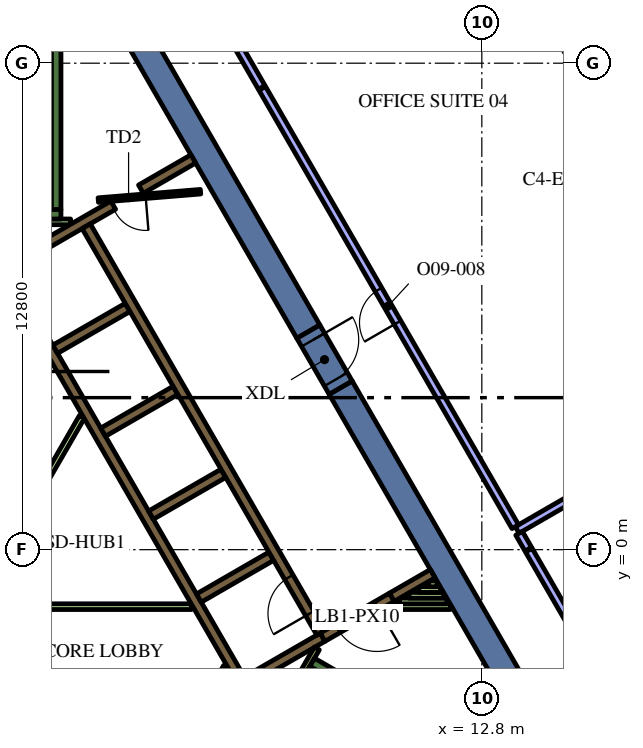
"""IFC4 building model, lengths in metres.
Left out: names, types, materials, properties, quantities, classifications, styles, units other than length and angle.
Written with IfcOpenShell. Run it as: python <this file> out.ifc"""

import sys

from ifc_helpers import new_model, si_unit, direction, frame, frame_2d, origin, place, context, subcontext, project, spatial, rectangle, extrude, element, fill, save


model = new_model("IFC4")
c1 = context("Model", 3, precision=1e-05, world=origin(), true_north=direction((0.0, 1.0)))
c2 = subcontext(c1, "Body", "Model", "MODEL_VIEW")
j1 = project(units=[si_unit("LENGTHUNIT", "METRE"), si_unit("PLANEANGLEUNIT", "RADIAN")], contexts=[c1])
p1 = place(None, origin())
s1 = spatial("IfcSite", under=j1, at=p1, CompositionType="ELEMENT")
p2 = place(p1, origin())
s2 = spatial("IfcBuilding", under=s1, at=p2, CompositionType="ELEMENT")
p3 = place(p2, frame((0.0, 0.0, 247.8)))
s3 = spatial("IfcBuildingStorey", under=s2, at=p3, CompositionType="ELEMENT", Elevation=247.8)
for number, where, z_axis, x_axis in (
    (1, (9.085, 4.264, 0.0), (0.0, 0.0, 1.0), (0.5, -0.866, 0.0)),
    (2, (8.235, 5.736, 0.0), (0.0, 0.0, 1.0), (-0.5, 0.866, 0.0)),
):
    element("IfcWall", number, at=place(p3, frame(where, z_axis=z_axis, x_axis=x_axis)), inside=s3, PredefinedType="SOLIDWALL", context=c2, shape_type="SweptSolid", body=[
        extrude(rectangle(XDim=12.472, YDim=0.7, at=frame_2d((6.236, 0.0))), origin(), (0.0, 0.0, 1.0), 4.2),
    ])
p4 = place(p3, frame((8.334, -2.964, 0.0), z_axis=(0.0, 0.0, 1.0), x_axis=(0.866016039709, -0.500016218704, 0.0)))
e3 = element("IfcWall", 3, at=p4, inside=s3, PredefinedType="SOLIDWALL", context=c2, shape_type="SweptSolid", body=[
    extrude(rectangle(XDim=7.05, YDim=0.25, at=frame_2d((3.525, 0.0))), origin(), (0.0, 0.0, 1.0), 4.2),
])
p5 = place(p3, frame((8.168, -3.503, 0.0), z_axis=(0.0, 0.0, 1.0), x_axis=(0.49972245349, 0.866185586049, 0.0)))
e4 = element("IfcWall", 4, at=p5, inside=s3, PredefinedType="SOLIDWALL", context=c2, shape_type="SweptSolid", body=[
    extrude(rectangle(XDim=0.425, YDim=0.25, at=frame_2d((0.212, 0.0))), origin(), (0.0, 0.0, 1.0), 4.2),
])
p6 = place(p3, frame((1.6, 8.95, 0.0), z_axis=(0.0, 0.0, 1.0), x_axis=(0.0, 1.0, 0.0)))
e5 = element("IfcWall", 5, at=p6, inside=s3, PredefinedType="SOLIDWALL", context=c2, shape_type="SweptSolid", body=[
    extrude(rectangle(XDim=6.8, YDim=0.25, at=frame_2d((3.4, 0.0))), origin(), (0.0, 0.0, 1.0), 4.2),
])
p7 = place(p3, frame((1.05, 8.825, 0.0), z_axis=(0.0, 0.0, 1.0), x_axis=(1.0, 0.0, 0.0)))
e6 = element("IfcWall", 6, at=p7, inside=s3, PredefinedType="SOLIDWALL", context=c2, shape_type="SweptSolid", body=[
    extrude(rectangle(XDim=0.675, YDim=0.25, at=frame_2d((0.337, 0.0))), origin(), (0.0, 0.0, 1.0), 4.2),
])
p8 = place(p3, frame((11.507, -0.631, 0.0), z_axis=(0.0, 0.0, 1.0), x_axis=(-0.866025525965, -0.499999788377, 0.0)))
e7 = element("IfcWall", 7, at=p8, inside=s3, PredefinedType="SOLIDWALL", context=c2, shape_type="SweptSolid", body=[
    extrude(rectangle(XDim=1.245, YDim=0.25, at=frame_2d((0.622, 0.0))), origin(), (0.0, 0.0, 1.0), 4.2),
])
p9 = place(p3, frame((6.568, -3.627, 0.0), z_axis=(0.0, 0.0, 1.0), x_axis=(-0.499999455981, 0.866025717874, 0.0)))
e8 = element("IfcWall", 8, at=p9, inside=s3, PredefinedType="SOLIDWALL", context=c2, shape_type="SweptSolid", body=[
    extrude(rectangle(XDim=11.978, YDim=0.25, at=frame_2d((5.989, 0.0))), origin(), (0.0, 0.0, 1.0), 4.2),
])
p10 = place(p3, frame((3.1, 9.064, 0.0), z_axis=(0.0, 0.0, 1.0), x_axis=(-0.866030133475, -0.499991807846, 0.0)))
e9 = element("IfcWall", 9, at=p10, inside=s3, PredefinedType="SOLIDWALL", context=c2, shape_type="SweptSolid", body=[
    extrude(rectangle(XDim=3.217, YDim=0.25, at=frame_2d((1.608, 0.0))), origin(), (0.0, 0.0, 1.0), 4.2),
])
p11 = place(p3, frame((1.574, 5.274, 0.0), z_axis=(0.0, 0.0, 1.0), x_axis=(0.866028486751, 0.499994660107, 0.0)))
e10 = element("IfcWall", 10, at=p11, inside=s3, PredefinedType="SOLIDWALL", context=c2, shape_type="SweptSolid", body=[
    extrude(rectangle(XDim=2.2, YDim=0.25, at=frame_2d((1.1, 0.0))), origin(), (0.0, 0.0, 1.0), 4.2),
])
for number, where, z_axis, x_axis in (
    (11, (2.834, 3.091, 0.0), (0.0, 0.0, 1.0), (0.866, 0.5, 0.0)),
    (12, (4.094, 0.909, 0.0), (0.0, 0.0, 1.0), (0.866, 0.5, 0.0)),
    (13, (5.354, -1.274, 0.0), (0.0, 0.0, 1.0), (0.866, 0.5, 0.0)),
):
    element("IfcWall", number, at=place(p3, frame(where, z_axis=z_axis, x_axis=x_axis)), inside=s3, PredefinedType="SOLIDWALL", context=c2, shape_type="SweptSolid", body=[
        extrude(rectangle(XDim=2.2, YDim=0.25, at=frame_2d((1.1, 0.0))), origin(), (0.0, 0.0, 1.0), 4.2),
    ])
p12 = place(p3, frame((6.614, -3.456, 0.0), z_axis=(0.0, 0.0, 1.0), x_axis=(0.866025089694, 0.500000544019, 0.0)))
e14 = element("IfcWall", 14, at=p12, inside=s3, PredefinedType="SOLIDWALL", context=c2, shape_type="SweptSolid", body=[
    extrude(rectangle(XDim=2.305, YDim=0.25, at=frame_2d((1.153, 0.0))), origin(), (0.0, 0.0, 1.0), 4.2),
])
p13 = place(p3, frame((3.83, 9.486, 0.0), z_axis=(0.0, 0.0, 1.0), x_axis=(0.865986202621, 0.500067892261, 0.0)))
e15 = element("IfcWall", 15, at=p13, inside=s3, PredefinedType="SOLIDWALL", context=c2, shape_type="SweptSolid", body=[
    extrude(rectangle(XDim=1.591, YDim=0.25, at=frame_2d((0.795, 0.0))), origin(), (0.0, 0.0, 1.0), 4.2),
])
p14 = place(p3, frame((1.05, 8.625, 0.0), z_axis=(0.0, 0.0, 1.0), x_axis=(1.0, 0.0, 0.0)))
e16 = element("IfcWall", 16, at=p14, inside=s3, PredefinedType="PARTITIONING", context=c2, shape_type="SweptSolid", body=[
    extrude(rectangle(XDim=0.929, YDim=0.15, at=frame_2d((0.464, 0.0))), origin(), (0.0, 0.0, 1.0), 3.45),
])
p15 = place(p3, frame((10.362, -1.5, 0.0), z_axis=(0.0, 0.0, 1.0), x_axis=(1.0, 0.0, 0.0)))
e17 = element("IfcWall", 17, at=p15, inside=s3, PredefinedType="PARTITIONING", context=c2, shape_type="SweptSolid", body=[
    extrude(rectangle(XDim=1.61, YDim=0.15, at=frame_2d((0.805, 0.0))), origin(), (0.0, 0.0, 1.0), 3.45),
])
p16 = place(p3, frame((10.622, -1.35, 0.0), z_axis=(0.0, 0.0, 1.0), x_axis=(1.0, 0.0, 0.0)))
e18 = element("IfcWall", 18, at=p16, inside=s3, PredefinedType="PARTITIONING", context=c2, shape_type="SweptSolid", body=[
    extrude(rectangle(XDim=1.263, YDim=0.15, at=frame_2d((0.632, 0.0))), origin(), (0.0, 0.0, 1.0), 3.45),
])
p17 = place(p3, frame((10.882, -1.2, 0.0), z_axis=(0.0, 0.0, 1.0), x_axis=(1.0, 0.0, 0.0)))
e19 = element("IfcWall", 19, at=p17, inside=s3, PredefinedType="PARTITIONING", context=c2, shape_type="SweptSolid", body=[
    extrude(rectangle(XDim=0.917, YDim=0.15, at=frame_2d((0.459, 0.0))), origin(), (0.0, 0.0, 1.0), 3.45),
])
p18 = place(p3, frame((11.712, -1.05, 0.0), z_axis=(0.0, 0.0, 1.0), x_axis=(-1.0, 0.0, 0.0)))
e20 = element("IfcWall", 20, at=p18, inside=s3, PredefinedType="PARTITIONING", context=c2, shape_type="SweptSolid", body=[
    extrude(rectangle(XDim=0.571, YDim=0.15, at=frame_2d((0.285, 0.0))), origin(), (0.0, 0.0, 1.0), 3.45),
])
p19 = place(p3, frame((11.401, -0.9, 0.0), z_axis=(0.0, 0.0, 1.0), x_axis=(1.0, 0.0, 0.0)))
e21 = element("IfcWall", 21, at=p19, inside=s3, PredefinedType="PARTITIONING", context=c2, shape_type="SweptSolid", body=[
    extrude(rectangle(XDim=0.224, YDim=0.15, at=frame_2d((0.112, 0.0))), origin(), (0.0, 0.0, 1.0), 3.45),
])
p20 = place(p3, frame((8.459, -2.599, 0.0), z_axis=(0.0, 0.0, 1.0), x_axis=(-0.500041054325, -0.866001699761, 0.0)))
e22 = element("IfcWall", 22, at=p20, inside=s3, PredefinedType="PARTITIONING", context=c2, shape_type="SweptSolid", body=[
    extrude(rectangle(XDim=0.929, YDim=0.15, at=frame_2d((0.464, 0.0))), origin(), (0.0, 0.0, 1.0), 4.2),
])
p21 = place(p3, frame((5.705, -3.718, 0.0), z_axis=(0.0, 0.0, 1.0), x_axis=(0.499962090823, 0.866047289552, 0.0)))
e23 = element("IfcWall", 23, at=p21, inside=s3, PredefinedType="PARTITIONING", context=c2, shape_type="SweptSolid", body=[
    extrude(rectangle(XDim=0.735, YDim=0.15, at=frame_2d((0.367, 0.0))), origin(), (0.0, 0.0, 1.0), 3.45),
])
p22 = place(p3, frame((-4.2, -1.5, 0.0), z_axis=(0.0, 0.0, 1.0), x_axis=(1.0, 0.0, 0.0)))
e24 = element("IfcWall", 24, at=p22, inside=s3, PredefinedType="PARTITIONING", context=c2, shape_type="SweptSolid", body=[
    extrude(rectangle(XDim=9.359, YDim=0.15, at=frame_2d((4.68, 0.0))), origin(), (0.0, 0.0, 1.0), 3.45),
])
p23 = place(p3, frame((1.312, 1.822, 0.0), z_axis=(0.0, 0.0, 1.0), x_axis=(0.500003549559, 0.866023354436, 0.0)))
e25 = element("IfcWall", 25, at=p23, inside=s3, PredefinedType="PARTITIONING", context=c2, shape_type="SweptSolid", body=[
    extrude(rectangle(XDim=1.93, YDim=0.15, at=frame_2d((0.965, 0.0))), origin(), (0.0, 0.0, 1.0), 3.45),
])
p24 = place(p3, frame((8.565, -2.185, 0.0), z_axis=(0.0, 0.0, 1.0), x_axis=(-0.499997954832, 0.866026584559, 0.0)))
e26 = element("IfcWall", 26, at=p24, inside=s3, PredefinedType="SOLIDWALL", context=c2, shape_type="SweptSolid", body=[
    extrude(rectangle(XDim=12.35, YDim=0.25, at=frame_2d((6.175, 0.0))), origin(), (0.0, 0.0, 1.0), 4.2),
])
p25 = place(p24, frame((0.585, 0.0, 0.0)))
e27 = element("IfcOpeningElement", 27, at=p25, cuts=e26, PredefinedType="OPENING", context=c2, shape_type="SweptSolid", body=[
    extrude(rectangle(XDim=1.1, YDim=2.1, at=frame_2d((0.55, 1.05))), frame((0.0, 0.135, 0.0), z_axis=(0.0, -1.0, 0.0), x_axis=(1.0, 0.0, 0.0)), (0.0, 0.0, 1.0), 0.27),
])
p26 = place(p3, frame((5.398, 9.419, 0.0), z_axis=(0.0, 0.0, 1.0), x_axis=(-0.996653416376, -0.081743303248, 0.0)))
e28 = element("IfcWall", 28, at=p26, inside=s3, PredefinedType="PARTITIONING", context=c2, shape_type="SweptSolid", body=[
    extrude(rectangle(XDim=2.7, YDim=0.12, at=frame_2d((1.35, 0.0))), origin(), (0.0, 0.0, 1.0), 3.45),
])
p27 = place(p26, frame((1.45, 0.0, 0.0)))
e29 = element("IfcOpeningElement", 29, at=p27, cuts=e28, PredefinedType="OPENING", context=c2, shape_type="SweptSolid", body=[
    extrude(rectangle(XDim=0.9, YDim=2.1, at=frame_2d((0.45, 1.05))), frame((0.0, 0.07, 0.0), z_axis=(0.0, -1.0, 0.0), x_axis=(1.0, 0.0, 0.0)), (0.0, 0.0, 1.0), 0.14),
])
p28 = place(p3, frame((10.429, -1.253, 0.0), z_axis=(0.0, 0.0, 1.0), x_axis=(-0.866009402589, -0.500027713859, 0.0)))
e30 = element("IfcWall", 30, at=p28, inside=s3, PredefinedType="SOLIDWALL", context=c2, shape_type="SweptSolid", body=[
    extrude(rectangle(XDim=2.1, YDim=0.25, at=frame_2d((1.05, 0.0))), origin(), (0.0, 0.0, 1.0), 4.2),
])
p29 = place(p28, frame((0.45, 0.0, 0.0)))
e31 = element("IfcOpeningElement", 31, at=p29, cuts=e30, PredefinedType="OPENING", context=c2, shape_type="SweptSolid", body=[
    extrude(rectangle(XDim=1.2, YDim=2.1, at=frame_2d((0.6, 1.05))), frame((0.0, 0.135, 0.0), z_axis=(0.0, -1.0, 0.0), x_axis=(1.0, 0.0, 0.0)), (0.0, 0.0, 1.0), 0.27),
])
p30 = place(p3, frame((8.235, 5.736, 0.0), z_axis=(0.0, 0.0, 1.0), x_axis=(0.499954529098, -0.86605165483, 0.0)))
e32 = element("IfcWall", 32, at=p30, inside=s3, PredefinedType="SOLIDWALL", context=c2, shape_type="SweptSolid", body=[
    extrude(rectangle(XDim=1.7, YDim=0.7, at=frame_2d((0.85, 0.0))), origin(), (0.0, 0.0, 1.0), 4.2),
])
p31 = place(p30, frame((0.25, 0.0, 0.0)))
e33 = element("IfcOpeningElement", 33, at=p31, cuts=e32, PredefinedType="OPENING", context=c2, shape_type="SweptSolid", body=[
    extrude(rectangle(XDim=1.2, YDim=2.1, at=frame_2d((0.6, 1.05))), frame((0.0, 0.36, 0.0), z_axis=(0.0, -1.0, 0.0), x_axis=(1.0, 0.0, 0.0)), (0.0, 0.0, 1.0), 0.72),
])
p32 = place(p3, frame((13.731, 0.518, 0.0), z_axis=(0.0, 0.0, 1.0), x_axis=(0.8660128559, 0.500021732944, 0.0)))
e34 = element("IfcWall", 34, at=p32, inside=s3, PredefinedType="PARTITIONING", context=c2, shape_type="SweptSolid", body=[
    extrude(rectangle(XDim=3.625, YDim=0.2, at=frame_2d((1.812, 0.0))), origin(), (0.0, 0.0, 1.0), 3.45),
])
p33 = place(p3, frame((14.022, 0.013, 0.0), z_axis=(0.0, 0.0, 1.0), x_axis=(-0.500159754115, 0.865933150054, 0.0)))
e35 = element("IfcWall", 35, at=p33, inside=s3, PredefinedType="PARTITIONING", context=c2, shape_type="SweptSolid", body=[
    extrude(rectangle(XDim=0.483, YDim=0.2, at=frame_2d((0.242, 0.0))), origin(), (0.0, 0.0, 1.0), 3.45),
])
p34 = place(p3, frame((17.681, -6.324, 0.0), z_axis=(0.0, 0.0, 1.0), x_axis=(-0.50002695829, 0.866009838849, 0.0)))
e36 = element("IfcWall", 36, at=p34, inside=s3, PredefinedType="PARTITIONING", context=c2, shape_type="SweptSolid", body=[
    extrude(rectangle(XDim=7.287, YDim=0.2, at=frame_2d((3.644, 0.0))), origin(), (0.0, 0.0, 1.0), 3.45),
])
p35 = place(p34, frame((3.1, 0.0, 0.0)))
e37 = element("IfcOpeningElement", 37, at=p35, cuts=e36, PredefinedType="OPENING", context=c2, shape_type="SweptSolid", body=[
    extrude(rectangle(XDim=1.0, YDim=2.1, at=frame_2d((0.5, 1.05))), frame((0.0, 0.11, 0.0), z_axis=(0.0, -1.0, 0.0), x_axis=(1.0, 0.0, 0.0)), (0.0, 0.0, 1.0), 0.22),
])
p36 = place(p3, frame((13.681, 0.604, 0.0), z_axis=(0.0, 0.0, 1.0), x_axis=(-0.500001759768, 0.86602438778, 0.0)))
e38 = element("IfcWall", 38, at=p36, inside=s3, PredefinedType="PARTITIONING", context=c2, shape_type="SweptSolid", body=[
    extrude(rectangle(XDim=13.317, YDim=0.2, at=frame_2d((6.658, 0.0))), origin(), (0.0, 0.0, 1.0), 3.45),
])
p37 = place(p36, frame((6.2, 0.0, 0.0)))
e39 = element("IfcOpeningElement", 39, at=p37, cuts=e38, PredefinedType="OPENING", context=c2, shape_type="SweptSolid", body=[
    extrude(rectangle(XDim=1.0, YDim=2.1, at=frame_2d((0.5, 1.05))), frame((0.0, 0.11, 0.0), z_axis=(0.0, -1.0, 0.0), x_axis=(1.0, 0.0, 0.0)), (0.0, 0.0, 1.0), 0.22),
])
p38 = place(p3, frame((7.007, 12.163, 0.0), z_axis=(0.0, 0.0, 1.0), x_axis=(-0.499986040413, 0.866033463206, 0.0)))
e40 = element("IfcWall", 40, at=p38, inside=s3, PredefinedType="PARTITIONING", context=c2, shape_type="SweptSolid", body=[
    extrude(rectangle(XDim=5.693, YDim=0.2, at=frame_2d((2.846, 0.0))), origin(), (0.0, 0.0, 1.0), 3.45),
])
p39 = place(p3, frame((16.782, 10.331, 0.0), z_axis=(0.0, 0.0, 1.0), x_axis=(-0.517846166225, 0.855473756538, 0.0)))
e41 = element("IfcWall", 41, at=p39, inside=s3, PredefinedType="SOLIDWALL", context=c2, shape_type="SweptSolid", body=[
    extrude(rectangle(XDim=5.298, YDim=0.24, at=frame_2d((2.649, 0.0))), origin(), (0.0, 0.0, 1.0), 3.95),
])
p40 = place(p39, frame((0.294, 0.0, 0.9)))
e42 = element("IfcOpeningElement", 42, at=p40, cuts=e41, PredefinedType="OPENING", context=c2, shape_type="SweptSolid", body=[
    extrude(rectangle(XDim=1.5, YDim=2.55, at=frame_2d((0.75, 1.275))), frame((0.0, 0.13, 0.0), z_axis=(0.0, -1.0, 0.0), x_axis=(1.0, 0.0, 0.0)), (0.0, 0.0, 1.0), 0.26),
])
p41 = place(p39, frame((3.504, 0.0, 0.9)))
e43 = element("IfcOpeningElement", 43, at=p41, cuts=e41, PredefinedType="OPENING", context=c2, shape_type="SweptSolid", body=[
    extrude(rectangle(XDim=1.5, YDim=2.55, at=frame_2d((0.75, 1.275))), frame((0.0, 0.13, 0.0), z_axis=(0.0, -1.0, 0.0), x_axis=(1.0, 0.0, 0.0)), (0.0, 0.0, 1.0), 0.26),
])
p42 = place(p25, origin())
e44 = element("IfcDoor", 44, at=p42, inside=s3, OperationType="DOUBLE_DOOR_SLIDING", PredefinedType="DOOR", context=c2, shape_type="SweptSolid", body=[
    extrude(rectangle(XDim=1.1, YDim=2.1, at=frame_2d((0.55, 1.05))), frame((0.0, 0.025, 0.0), z_axis=(0.0, -1.0, 0.0), x_axis=(1.0, 0.0, 0.0)), (0.0, 0.0, 1.0), 0.05),
])
fill(e27, e44)
p43 = place(p27, origin())
e45 = element("IfcDoor", 45, at=p43, inside=s3, OperationType="SINGLE_SWING_LEFT", PredefinedType="DOOR", context=c2, shape_type="SweptSolid", body=[
    extrude(rectangle(XDim=0.9, YDim=2.1, at=frame_2d((0.45, 1.05))), frame((0.0, 0.025, 0.0), z_axis=(0.0, -1.0, 0.0), x_axis=(1.0, 0.0, 0.0)), (0.0, 0.0, 1.0), 0.05),
])
fill(e29, e45)
p44 = place(p29, origin())
e46 = element("IfcDoor", 46, at=p44, inside=s3, OperationType="SINGLE_SWING_LEFT", PredefinedType="DOOR", context=c2, shape_type="SweptSolid", body=[
    extrude(rectangle(XDim=1.2, YDim=2.1, at=frame_2d((0.6, 1.05))), frame((0.0, 0.025, 0.0), z_axis=(0.0, -1.0, 0.0), x_axis=(1.0, 0.0, 0.0)), (0.0, 0.0, 1.0), 0.05),
])
fill(e31, e46)
p45 = place(p31, origin())
e47 = element("IfcDoor", 47, at=p45, inside=s3, OperationType="SINGLE_SWING_LEFT", PredefinedType="DOOR", context=c2, shape_type="SweptSolid", body=[
    extrude(rectangle(XDim=1.2, YDim=2.1, at=frame_2d((0.6, 1.05))), frame((0.0, 0.025, 0.0), z_axis=(0.0, -1.0, 0.0), x_axis=(1.0, 0.0, 0.0)), (0.0, 0.0, 1.0), 0.05),
])
fill(e33, e47)
p46 = place(p37, origin())
e48 = element("IfcDoor", 48, at=p46, inside=s3, OperationType="SINGLE_SWING_RIGHT", PredefinedType="DOOR", context=c2, shape_type="SweptSolid", body=[
    extrude(rectangle(XDim=1.0, YDim=2.1, at=frame_2d((0.5, 1.05))), frame((0.0, 0.025, 0.0), z_axis=(0.0, -1.0, 0.0), x_axis=(1.0, 0.0, 0.0)), (0.0, 0.0, 1.0), 0.05),
])
fill(e39, e48)
save(model, sys.argv[1])
